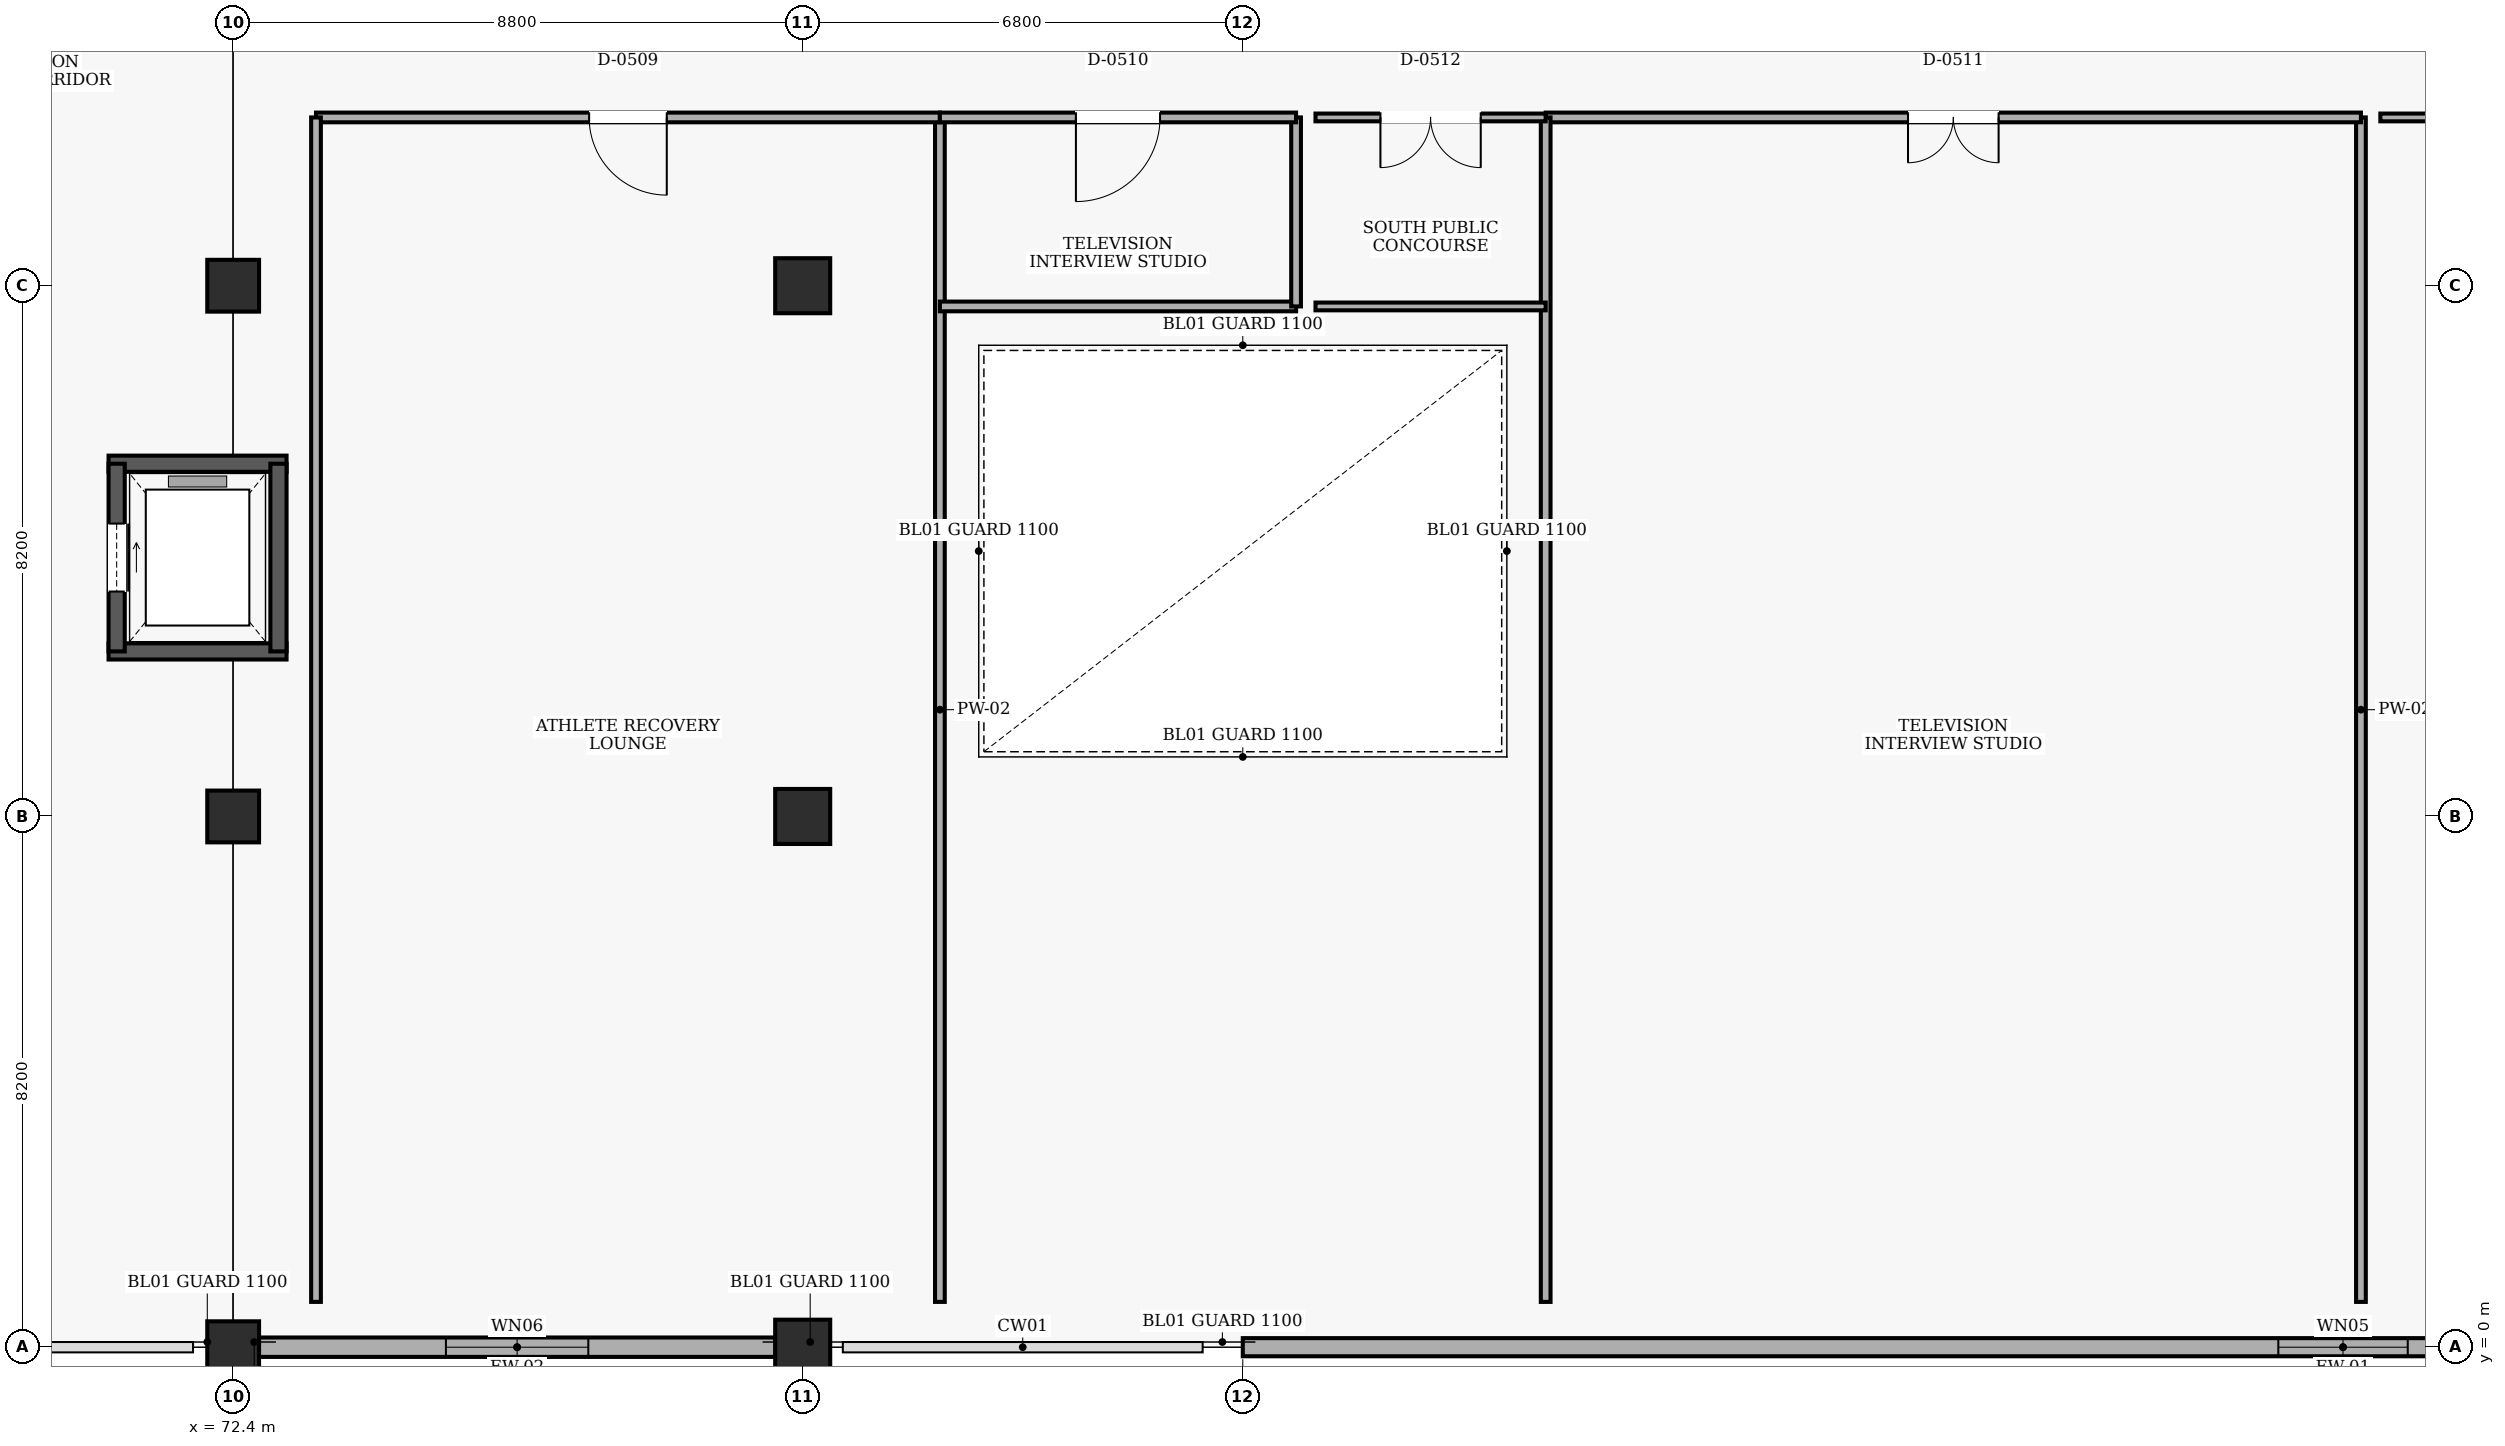
"""IFC4 building model, lengths in metres.
Left out: names, types, materials, properties, quantities, classifications, styles, units other than length and angle.
Written with IfcOpenShell. Run it as: python <this file> out.ifc"""

import sys

from ifc_helpers import new_model, si_unit, direction, frame, frame_2d, origin, origin_2d, place, context, subcontext, project, spatial, rectangle, extrude, element, fill, save


model = new_model("IFC4")
c1 = context("Model", 3, precision=1e-05, world=origin(), true_north=direction((0.0, 1.0)))
c2 = subcontext(c1, "Body", "Model", "MODEL_VIEW")
j1 = project(units=[si_unit("LENGTHUNIT", "METRE"), si_unit("PLANEANGLEUNIT", "RADIAN")], contexts=[c1])
p1 = place(None, origin())
s1 = spatial("IfcSite", under=j1, at=p1, CompositionType="ELEMENT")
p2 = place(p1, origin())
s2 = spatial("IfcBuilding", under=s1, at=p2, CompositionType="ELEMENT")
p3 = place(p2, frame((0.0, 0.0, 5.4)))
s3 = spatial("IfcBuildingStorey", under=s2, at=p3, CompositionType="ELEMENT", Elevation=5.4)
for number, where, z_axis, x_axis in (
    (1, (72.4, 0.0, 0.0), (0.0, 0.0, 1.0), (1.0, 0.0, 0.0)),
    (2, (72.4, 8.2, 0.0), (0.0, 0.0, 1.0), (1.0, 0.0, 0.0)),
    (3, (72.4, 16.4, 0.0), (0.0, 0.0, 1.0), (1.0, 0.0, 0.0)),
):
    element("IfcColumn", number, at=place(p3, frame(where, z_axis=z_axis, x_axis=x_axis)), inside=s3, PredefinedType="COLUMN", context=c2, shape_type="SweptSolid", body=[
        extrude(rectangle(XDim=0.8, YDim=0.8, at=origin_2d()), origin(), (0.0, 0.0, 1.0), 4.8),
    ])
for number, where, z_axis, x_axis in (
    (4, (81.2, 0.0, 0.0), (0.0, 0.0, 1.0), (1.0, 0.0, 0.0)),
    (5, (81.2, 8.2, 0.0), (0.0, 0.0, 1.0), (1.0, 0.0, 0.0)),
    (6, (81.2, 16.4, 0.0), (0.0, 0.0, 1.0), (1.0, 0.0, 0.0)),
):
    element("IfcColumn", number, at=place(p3, frame(where, z_axis=z_axis, x_axis=x_axis)), inside=s3, PredefinedType="COLUMN", context=c2, shape_type="SweptSolid", body=[
        extrude(rectangle(XDim=0.85, YDim=0.85, at=origin_2d()), origin(), (0.0, 0.0, 1.0), 4.8),
    ])
p4 = place(p3, frame((122.0, 0.0, 0.0), z_axis=(0.0, 0.0, 1.0), x_axis=(-1.0, 0.0, 0.0)))
e7 = element("IfcWall", 7, at=p4, inside=s3, PredefinedType="SOLIDWALL", context=c2, shape_type="SweptSolid", body=[
    extrude(rectangle(XDim=34.0, YDim=0.28, at=frame_2d((17.0, 0.0))), origin(), (0.0, 0.0, 1.0), 4.48),
])
p5 = place(p4, frame((16.0, 0.0, 0.9)))
e8 = element("IfcOpeningElement", 8, at=p5, cuts=e7, PredefinedType="OPENING", context=c2, shape_type="SweptSolid", body=[
    extrude(rectangle(XDim=2.0, YDim=1.5, at=frame_2d((1.0, 0.75))), frame((0.0, 0.15, 0.0), z_axis=(0.0, -1.0, 0.0), x_axis=(1.0, 0.0, 0.0)), (0.0, 0.0, 1.0), 0.3),
])
p6 = place(p3, frame((80.78, 0.0, 0.0), z_axis=(0.0, 0.0, 1.0), x_axis=(-1.0, 0.0, 0.0)))
e9 = element("IfcWall", 9, at=p6, inside=s3, PredefinedType="SOLIDWALL", context=c2, shape_type="SweptSolid", body=[
    extrude(rectangle(XDim=7.985, YDim=0.3, at=frame_2d((3.993, 0.0))), origin(), (0.0, 0.0, 1.0), 3.68),
])
p7 = place(p6, frame((2.893, 0.0, 0.9)))
e10 = element("IfcOpeningElement", 10, at=p7, cuts=e9, PredefinedType="OPENING", context=c2, shape_type="SweptSolid", body=[
    extrude(rectangle(XDim=2.2, YDim=1.5, at=frame_2d((1.1, 0.75))), frame((0.0, 0.16, 0.0), z_axis=(0.0, -1.0, 0.0), x_axis=(1.0, 0.0, 0.0)), (0.0, 0.0, 1.0), 0.32),
])
for number, where, z_axis, x_axis in (
    (11, (70.475, 10.75, 0.0), (0.0, 0.0, 1.0), (1.0, 0.0, 0.0)),
    (12, (73.225, 13.65, 0.0), (0.0, 0.0, 1.0), (-1.0, 0.0, 0.0)),
):
    element("IfcWall", number, at=place(p3, frame(where, z_axis=z_axis, x_axis=x_axis)), inside=s3, PredefinedType="SHEAR", context=c2, shape_type="SweptSolid", body=[
        extrude(rectangle(XDim=2.75, YDim=0.25, at=frame_2d((1.375, 0.0))), origin(), (0.0, 0.0, 1.0), 4.5),
    ])
p8 = place(p3, frame((70.6, 13.65, 0.0), z_axis=(0.0, 0.0, 1.0), x_axis=(0.0, -1.0, 0.0)))
e13 = element("IfcWall", 13, at=p8, inside=s3, PredefinedType="SHEAR", context=c2, shape_type="SweptSolid", body=[
    extrude(rectangle(XDim=2.9, YDim=0.25, at=frame_2d((1.45, 0.0))), origin(), (0.0, 0.0, 1.0), 4.5),
])
p9 = place(p8, frame((0.925, 0.0, 0.0)))
e14 = element("IfcOpeningElement", 14, at=p9, cuts=e13, PredefinedType="OPENING", context=c2, shape_type="SweptSolid", body=[
    extrude(rectangle(XDim=1.05, YDim=2.15, at=frame_2d((0.525, 1.075))), frame((0.0, 0.135, 0.0), z_axis=(0.0, -1.0, 0.0), x_axis=(1.0, 0.0, 0.0)), (0.0, 0.0, 1.0), 0.27),
])
p10 = place(p3, frame((73.1, 10.75, 0.0), z_axis=(0.0, 0.0, 1.0), x_axis=(0.0, 1.0, 0.0)))
e15 = element("IfcWall", 15, at=p10, inside=s3, PredefinedType="SHEAR", context=c2, shape_type="SweptSolid", body=[
    extrude(rectangle(XDim=2.9, YDim=0.25, at=frame_2d((1.45, 0.0))), origin(), (0.0, 0.0, 1.0), 4.5),
])
p11 = place(p3, frame((83.32, 0.7, 0.0), z_axis=(0.0, 0.0, 1.0), x_axis=(0.0, 1.0, 0.0)))
e16 = element("IfcWall", 16, at=p11, inside=s3, PredefinedType="PARTITIONING", context=c2, shape_type="SweptSolid", body=[
    extrude(rectangle(XDim=18.3, YDim=0.15, at=frame_2d((9.15, 0.0))), origin(), (0.0, 0.0, 1.0), 4.5),
])
p12 = place(p3, frame((83.32, 19.0, 0.0), z_axis=(0.0, 0.0, 1.0), x_axis=(-1.0, 0.0, 0.0)))
e17 = element("IfcWall", 17, at=p12, inside=s3, PredefinedType="PARTITIONING", context=c2, shape_type="SweptSolid", body=[
    extrude(rectangle(XDim=9.64, YDim=0.15, at=frame_2d((4.82, 0.0))), origin(), (0.0, 0.0, 1.0), 4.5),
])
p13 = place(p12, frame((4.22, 0.0, 0.0)))
e18 = element("IfcOpeningElement", 18, at=p13, cuts=e17, PredefinedType="OPENING", context=c2, shape_type="SweptSolid", body=[
    extrude(rectangle(XDim=1.2, YDim=2.15, at=frame_2d((0.6, 1.075))), frame((0.0, 0.085, 0.0), z_axis=(0.0, -1.0, 0.0), x_axis=(1.0, 0.0, 0.0)), (0.0, 0.0, 1.0), 0.17),
])
p14 = place(p3, frame((73.68, 19.0, 0.0), z_axis=(0.0, 0.0, 1.0), x_axis=(0.0, -1.0, 0.0)))
e19 = element("IfcWall", 19, at=p14, inside=s3, PredefinedType="PARTITIONING", context=c2, shape_type="SweptSolid", body=[
    extrude(rectangle(XDim=18.3, YDim=0.15, at=frame_2d((9.15, 0.0))), origin(), (0.0, 0.0, 1.0), 4.5),
])
p15 = place(p3, frame((83.32, 16.08, 0.0), z_axis=(0.0, 0.0, 1.0), x_axis=(1.0, 0.0, 0.0)))
e20 = element("IfcWall", 20, at=p15, inside=s3, PredefinedType="PARTITIONING", context=c2, shape_type="SweptSolid", body=[
    extrude(rectangle(XDim=5.503, YDim=0.15, at=frame_2d((2.751, 0.0))), origin(), (0.0, 0.0, 1.0), 4.5),
])
p16 = place(p3, frame((88.823, 16.08, 0.0), z_axis=(0.0, 0.0, 1.0), x_axis=(0.0, 1.0, 0.0)))
e21 = element("IfcWall", 21, at=p16, inside=s3, PredefinedType="PARTITIONING", context=c2, shape_type="SweptSolid", body=[
    extrude(rectangle(XDim=2.92, YDim=0.15, at=frame_2d((1.46, 0.0))), origin(), (0.0, 0.0, 1.0), 4.5),
])
p17 = place(p3, frame((88.823, 19.0, 0.0), z_axis=(0.0, 0.0, 1.0), x_axis=(-1.0, 0.0, 0.0)))
e22 = element("IfcWall", 22, at=p17, inside=s3, PredefinedType="PARTITIONING", context=c2, shape_type="SweptSolid", body=[
    extrude(rectangle(XDim=5.503, YDim=0.15, at=frame_2d((2.751, 0.0))), origin(), (0.0, 0.0, 1.0), 4.5),
])
p18 = place(p17, frame((2.102, 0.0, 0.0)))
e23 = element("IfcOpeningElement", 23, at=p18, cuts=e22, PredefinedType="OPENING", context=c2, shape_type="SweptSolid", body=[
    extrude(rectangle(XDim=1.3, YDim=2.2, at=frame_2d((0.65, 1.1))), frame((0.0, 0.085, 0.0), z_axis=(0.0, -1.0, 0.0), x_axis=(1.0, 0.0, 0.0)), (0.0, 0.0, 1.0), 0.17),
])
p19 = place(p3, frame((105.277, 0.7, 0.0), z_axis=(0.0, 0.0, 1.0), x_axis=(0.0, 1.0, 0.0)))
e24 = element("IfcWall", 24, at=p19, inside=s3, PredefinedType="PARTITIONING", context=c2, shape_type="SweptSolid", body=[
    extrude(rectangle(XDim=18.3, YDim=0.15, at=frame_2d((9.15, 0.0))), origin(), (0.0, 0.0, 1.0), 4.5),
])
p20 = place(p3, frame((105.277, 19.0, 0.0), z_axis=(0.0, 0.0, 1.0), x_axis=(-1.0, 0.0, 0.0)))
e25 = element("IfcWall", 25, at=p20, inside=s3, PredefinedType="PARTITIONING", context=c2, shape_type="SweptSolid", body=[
    extrude(rectangle(XDim=12.597, YDim=0.15, at=frame_2d((6.298, 0.0))), origin(), (0.0, 0.0, 1.0), 4.5),
])
p21 = place(p20, frame((5.598, 0.0, 0.0)))
e26 = element("IfcOpeningElement", 26, at=p21, cuts=e25, PredefinedType="OPENING", context=c2, shape_type="SweptSolid", body=[
    extrude(rectangle(XDim=1.4, YDim=2.2, at=frame_2d((0.7, 1.1))), frame((0.0, 0.085, 0.0), z_axis=(0.0, -1.0, 0.0), x_axis=(1.0, 0.0, 0.0)), (0.0, 0.0, 1.0), 0.17),
])
p22 = place(p3, frame((92.68, 19.0, 0.0), z_axis=(0.0, 0.0, 1.0), x_axis=(0.0, -1.0, 0.0)))
e27 = element("IfcWall", 27, at=p22, inside=s3, PredefinedType="PARTITIONING", context=c2, shape_type="SweptSolid", body=[
    extrude(rectangle(XDim=18.3, YDim=0.15, at=frame_2d((9.15, 0.0))), origin(), (0.0, 0.0, 1.0), 4.5),
])
p23 = place(p3, frame((89.123, 16.08, 0.0), z_axis=(0.0, 0.0, 1.0), x_axis=(1.0, 0.0, 0.0)))
e28 = element("IfcWall", 28, at=p23, inside=s3, PredefinedType="PARTITIONING", context=c2, shape_type="SweptSolid", body=[
    extrude(rectangle(XDim=3.557, YDim=0.12, at=frame_2d((1.778, 0.0))), origin(), (0.0, 0.0, 1.0), 4.5),
])
p24 = place(p3, frame((92.68, 19.0, 0.0), z_axis=(0.0, 0.0, 1.0), x_axis=(-1.0, 0.0, 0.0)))
e29 = element("IfcWall", 29, at=p24, inside=s3, PredefinedType="PARTITIONING", context=c2, shape_type="SweptSolid", body=[
    extrude(rectangle(XDim=3.557, YDim=0.12, at=frame_2d((1.778, 0.0))), origin(), (0.0, 0.0, 1.0), 4.5),
])
p25 = place(p24, frame((1.003, 0.0, 0.0)))
e30 = element("IfcOpeningElement", 30, at=p25, cuts=e29, PredefinedType="OPENING", context=c2, shape_type="SweptSolid", body=[
    extrude(rectangle(XDim=1.55, YDim=2.2, at=frame_2d((0.775, 1.1))), frame((0.0, 0.07, 0.0), z_axis=(0.0, -1.0, 0.0), x_axis=(1.0, 0.0, 0.0)), (0.0, 0.0, 1.0), 0.14),
])
p26 = place(p3, frame((121.73, 19.0, 0.0), z_axis=(0.0, 0.0, 1.0), x_axis=(-1.0, 0.0, 0.0)))
e31 = element("IfcWall", 31, at=p26, inside=s3, PredefinedType="PARTITIONING", context=c2, shape_type="SweptSolid", body=[
    extrude(rectangle(XDim=16.153, YDim=0.12, at=frame_2d((8.077, 0.0))), origin(), (0.0, 0.0, 1.0), 4.5),
])
p27 = place(p26, frame((7.237, 0.0, 0.0)))
e32 = element("IfcOpeningElement", 32, at=p27, cuts=e31, PredefinedType="OPENING", context=c2, shape_type="SweptSolid", body=[
    extrude(rectangle(XDim=1.68, YDim=2.25, at=frame_2d((0.84, 1.125))), frame((0.0, 0.07, 0.0), z_axis=(0.0, -1.0, 0.0), x_axis=(1.0, 0.0, 0.0)), (0.0, 0.0, 1.0), 0.14),
])
p28 = place(p5, origin())
e33 = element("IfcWindow", 33, at=p28, inside=s3, PartitioningType="SINGLE_PANEL", PredefinedType="WINDOW", context=c2, shape_type="SweptSolid", body=[
    extrude(rectangle(XDim=2.0, YDim=1.5, at=frame_2d((1.0, 0.75))), frame((0.0, 0.03, 0.0), z_axis=(0.0, -1.0, 0.0), x_axis=(1.0, 0.0, 0.0)), (0.0, 0.0, 1.0), 0.06),
])
fill(e8, e33)
p29 = place(p7, origin())
e34 = element("IfcWindow", 34, at=p29, inside=s3, PartitioningType="SINGLE_PANEL", PredefinedType="WINDOW", context=c2, shape_type="SweptSolid", body=[
    extrude(rectangle(XDim=2.2, YDim=1.5, at=frame_2d((1.1, 0.75))), frame((0.0, 0.03, 0.0), z_axis=(0.0, -1.0, 0.0), x_axis=(1.0, 0.0, 0.0)), (0.0, 0.0, 1.0), 0.06),
])
fill(e10, e34)
p30 = place(p9, origin())
e35 = element("IfcDoor", 35, at=p30, inside=s3, OperationType="SLIDING_TO_RIGHT", PredefinedType="DOOR", context=c2, shape_type="SweptSolid", body=[
    extrude(rectangle(XDim=1.05, YDim=2.15, at=frame_2d((0.525, 1.075))), frame((0.0, 0.025, 0.0), z_axis=(0.0, -1.0, 0.0), x_axis=(1.0, 0.0, 0.0)), (0.0, 0.0, 1.0), 0.05),
])
fill(e14, e35)
p31 = place(p13, origin())
e36 = element("IfcDoor", 36, at=p31, inside=s3, OperationType="SINGLE_SWING_LEFT", PredefinedType="DOOR", context=c2, shape_type="SweptSolid", body=[
    extrude(rectangle(XDim=1.2, YDim=2.15, at=frame_2d((0.6, 1.075))), frame((0.0, 0.025, 0.0), z_axis=(0.0, -1.0, 0.0), x_axis=(1.0, 0.0, 0.0)), (0.0, 0.0, 1.0), 0.05),
])
fill(e18, e36)
p32 = place(p18, origin())
e37 = element("IfcDoor", 37, at=p32, inside=s3, OperationType="SINGLE_SWING_RIGHT", PredefinedType="DOOR", context=c2, shape_type="SweptSolid", body=[
    extrude(rectangle(XDim=1.3, YDim=2.2, at=frame_2d((0.65, 1.1))), frame((0.0, 0.025, 0.0), z_axis=(0.0, -1.0, 0.0), x_axis=(1.0, 0.0, 0.0)), (0.0, 0.0, 1.0), 0.05),
])
fill(e23, e37)
p33 = place(p21, origin())
e38 = element("IfcDoor", 38, at=p33, inside=s3, OperationType="DOUBLE_DOOR_SINGLE_SWING", PredefinedType="DOOR", context=c2, shape_type="SweptSolid", body=[
    extrude(rectangle(XDim=1.4, YDim=2.2, at=frame_2d((0.7, 1.1))), frame((0.0, 0.025, 0.0), z_axis=(0.0, -1.0, 0.0), x_axis=(1.0, 0.0, 0.0)), (0.0, 0.0, 1.0), 0.05),
])
fill(e26, e38)
p34 = place(p25, origin())
e39 = element("IfcDoor", 39, at=p34, inside=s3, OperationType="DOUBLE_DOOR_SINGLE_SWING", PredefinedType="DOOR", context=c2, shape_type="SweptSolid", body=[
    extrude(rectangle(XDim=1.55, YDim=2.2, at=frame_2d((0.775, 1.1))), frame((0.0, 0.025, 0.0), z_axis=(0.0, -1.0, 0.0), x_axis=(1.0, 0.0, 0.0)), (0.0, 0.0, 1.0), 0.05),
])
fill(e30, e39)
save(model, sys.argv[1])
